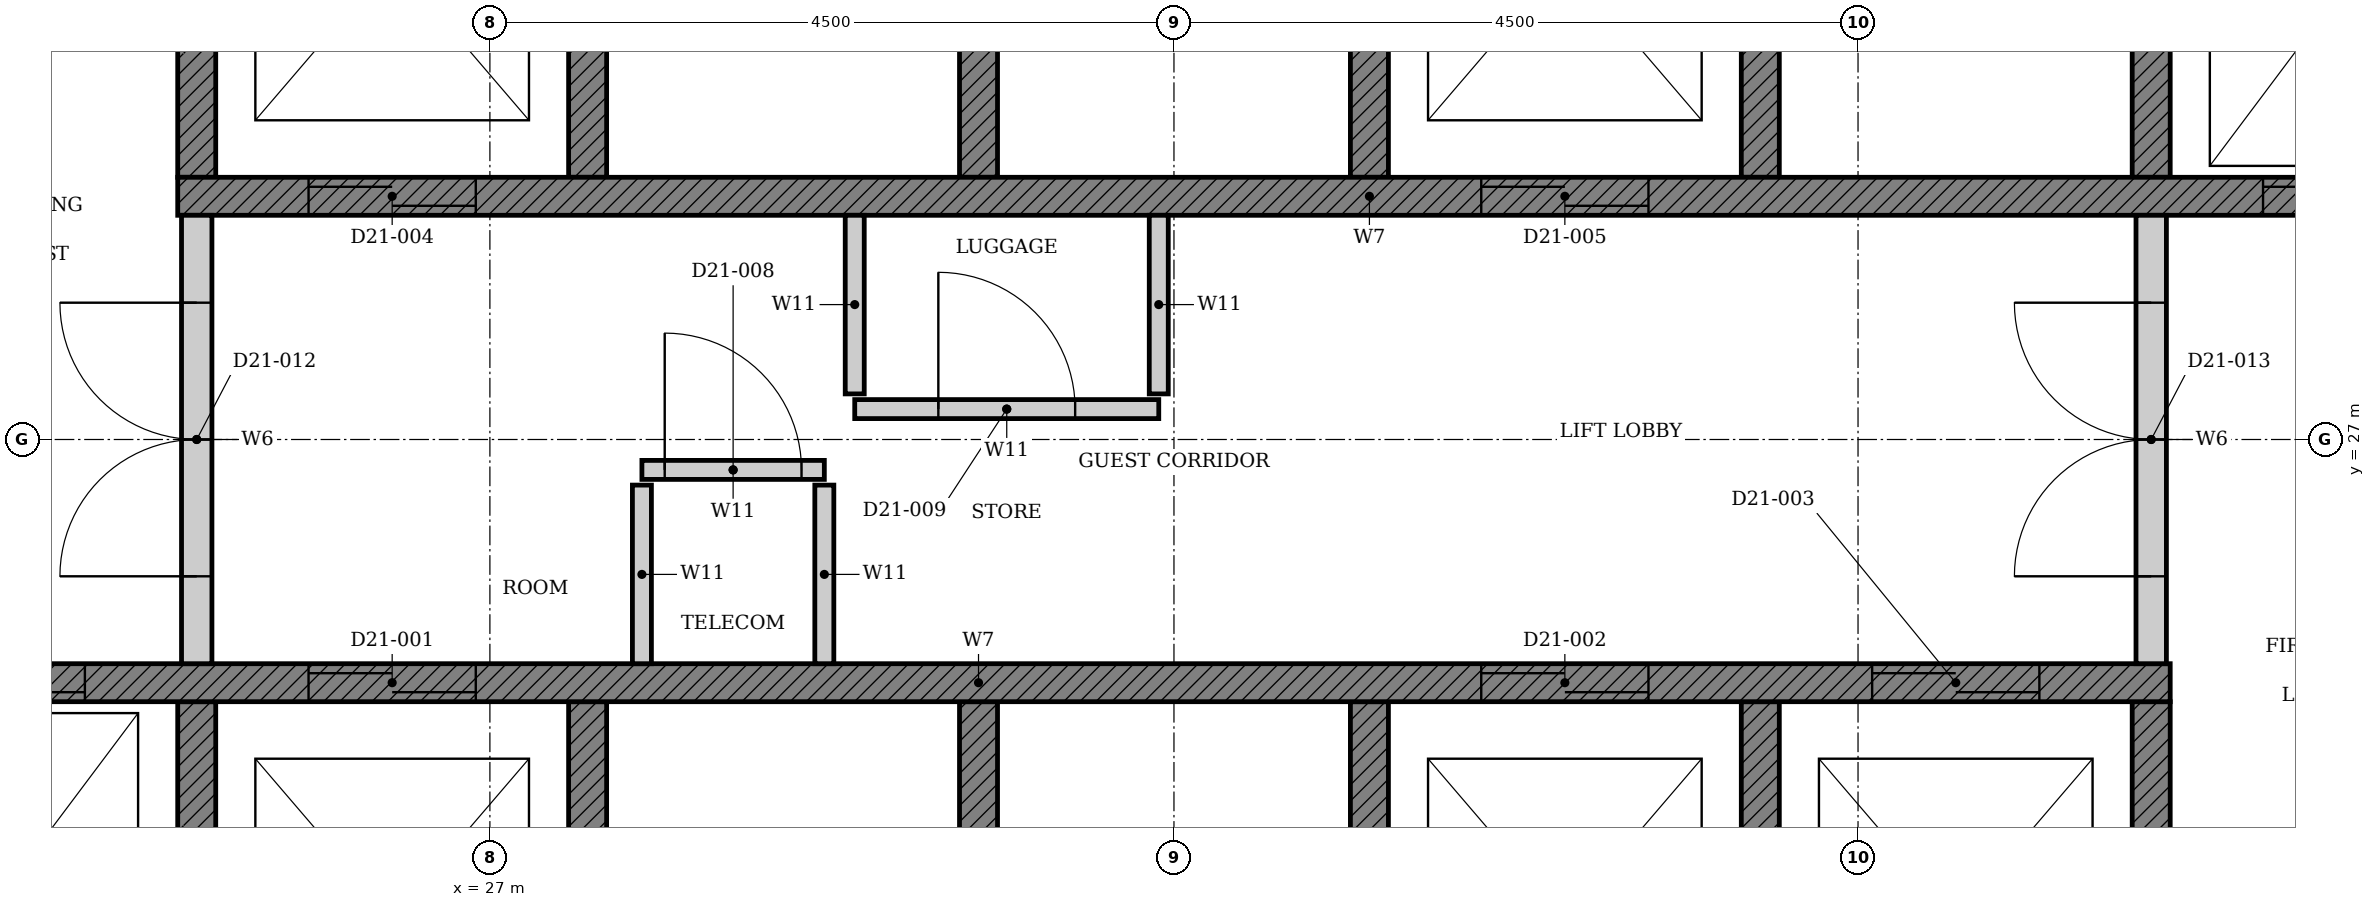
"""IFC4 building model, lengths in metres.
Left out: names, types, materials, properties, quantities, classifications, styles, units other than length and angle.
Written with IfcOpenShell. Run it as: python <this file> out.ifc"""

import sys

from ifc_helpers import new_model, si_unit, direction, frame, frame_2d, origin, place, context, subcontext, project, spatial, polyline, rectangle, outline, extrude, element, fill, save


model = new_model("IFC4")
c1 = context("Model", 3, precision=1e-05, world=origin(), true_north=direction((0.0, 1.0)))
c2 = subcontext(c1, "Body", "Model", "MODEL_VIEW")
j1 = project(units=[si_unit("LENGTHUNIT", "METRE"), si_unit("PLANEANGLEUNIT", "RADIAN")], contexts=[c1])
p1 = place(None, origin())
s1 = spatial("IfcSite", under=j1, at=p1, CompositionType="ELEMENT")
p2 = place(p1, origin())
s2 = spatial("IfcBuilding", under=s1, at=p2, CompositionType="ELEMENT")
p3 = place(p2, frame((0.0, 0.0, 88.8)))
s3 = spatial("IfcBuildingStorey", under=s2, at=p3, CompositionType="ELEMENT", Elevation=88.8)
p4 = place(p3, origin())
e1 = element("IfcWall", 1, at=p4, inside=s3, PredefinedType="SHEAR", context=c2, shape_type="SweptSolid", body=[
    extrude(outline(polyline([(22.375, 22.35), (38.053, 22.35), (38.053, 25.275), (37.803, 25.275), (37.803, 22.65), (35.482, 22.65), (35.482, 25.275), (35.232, 25.275), (35.232, 22.65), (32.911, 22.65), (32.911, 25.275), (32.661, 25.275), (32.661, 22.65), (30.339, 22.65), (30.339, 25.275), (30.089, 25.275), (30.089, 22.65), (27.768, 22.65), (27.768, 25.275), (27.518, 25.275), (27.518, 22.65), (25.197, 22.65), (25.197, 25.275), (24.947, 25.275), (24.947, 22.65), (22.625, 22.65), (22.625, 25.275), (22.375, 25.275), (22.375, 22.35)])), origin(), (0.0, 0.0, 1.0), 3.3),
])
p5 = place(p3, origin())
e2 = element("IfcWall", 2, at=p5, inside=s3, PredefinedType="SHEAR", context=c2, shape_type="SweptSolid", body=[
    extrude(outline(polyline([(24.947, 28.725), (25.197, 28.725), (25.197, 31.35), (27.518, 31.35), (27.518, 28.725), (27.768, 28.725), (27.768, 31.35), (30.089, 31.35), (30.089, 28.725), (30.339, 28.725), (30.339, 31.35), (32.661, 31.35), (32.661, 28.725), (32.911, 28.725), (32.911, 31.35), (35.232, 31.35), (35.232, 28.725), (35.482, 28.725), (35.482, 31.35), (37.803, 31.35), (37.803, 28.725), (38.053, 28.725), (38.053, 31.35), (40.375, 31.35), (40.375, 28.725), (40.625, 28.725), (40.625, 31.65), (24.947, 31.65), (24.947, 28.725)])), origin(), (0.0, 0.0, 1.0), 3.3),
])
p6 = place(p3, frame((22.375, 25.4, 0.0), z_axis=(0.0, 0.0, 1.0), x_axis=(1.0, 0.0, 0.0)))
e3 = element("IfcWall", 3, at=p6, inside=s3, PredefinedType="SHEAR", context=c2, shape_type="SweptSolid", body=[
    extrude(rectangle(XDim=15.678, YDim=0.25, at=frame_2d((7.839, 0.0))), origin(), (0.0, 0.0, 1.0), 3.3),
])
p7 = place(p6, frame((3.432, 0.0, 0.0)))
e4 = element("IfcOpeningElement", 4, at=p7, cuts=e3, PredefinedType="OPENING", context=c2, shape_type="SweptSolid", body=[
    extrude(rectangle(XDim=1.1, YDim=2.1, at=frame_2d((0.55, 1.05))), frame((0.0, 0.135, 0.0), z_axis=(0.0, -1.0, 0.0), x_axis=(1.0, 0.0, 0.0)), (0.0, 0.0, 1.0), 0.27),
])
p8 = place(p6, frame((11.146, 0.0, 0.0)))
e5 = element("IfcOpeningElement", 5, at=p8, cuts=e3, PredefinedType="OPENING", context=c2, shape_type="SweptSolid", body=[
    extrude(rectangle(XDim=1.1, YDim=2.1, at=frame_2d((0.55, 1.05))), frame((0.0, 0.135, 0.0), z_axis=(0.0, -1.0, 0.0), x_axis=(1.0, 0.0, 0.0)), (0.0, 0.0, 1.0), 0.27),
])
p9 = place(p6, frame((13.718, 0.0, 0.0)))
e6 = element("IfcOpeningElement", 6, at=p9, cuts=e3, PredefinedType="OPENING", context=c2, shape_type="SweptSolid", body=[
    extrude(rectangle(XDim=1.1, YDim=2.1, at=frame_2d((0.55, 1.05))), frame((0.0, 0.135, 0.0), z_axis=(0.0, -1.0, 0.0), x_axis=(1.0, 0.0, 0.0)), (0.0, 0.0, 1.0), 0.27),
])
p10 = place(p6, frame((0.861, 0.0, 0.0)))
e7 = element("IfcOpeningElement", 7, at=p10, cuts=e3, PredefinedType="OPENING", context=c2, shape_type="SweptSolid", body=[
    extrude(rectangle(XDim=1.1, YDim=2.1, at=frame_2d((0.55, 1.05))), frame((0.0, 0.135, 0.0), z_axis=(0.0, -1.0, 0.0), x_axis=(1.0, 0.0, 0.0)), (0.0, 0.0, 1.0), 0.27),
])
p11 = place(p3, frame((24.947, 28.6, 0.0), z_axis=(0.0, 0.0, 1.0), x_axis=(1.0, 0.0, 0.0)))
e8 = element("IfcWall", 8, at=p11, inside=s3, PredefinedType="SHEAR", context=c2, shape_type="SweptSolid", body=[
    extrude(rectangle(XDim=15.678, YDim=0.25, at=frame_2d((7.839, 0.0))), origin(), (0.0, 0.0, 1.0), 3.3),
])
p12 = place(p11, frame((0.861, 0.0, 0.0)))
e9 = element("IfcOpeningElement", 9, at=p12, cuts=e8, PredefinedType="OPENING", context=c2, shape_type="SweptSolid", body=[
    extrude(rectangle(XDim=1.1, YDim=2.1, at=frame_2d((0.55, 1.05))), frame((0.0, 0.135, 0.0), z_axis=(0.0, -1.0, 0.0), x_axis=(1.0, 0.0, 0.0)), (0.0, 0.0, 1.0), 0.27),
])
p13 = place(p11, frame((8.575, 0.0, 0.0)))
e10 = element("IfcOpeningElement", 10, at=p13, cuts=e8, PredefinedType="OPENING", context=c2, shape_type="SweptSolid", body=[
    extrude(rectangle(XDim=1.1, YDim=2.1, at=frame_2d((0.55, 1.05))), frame((0.0, 0.135, 0.0), z_axis=(0.0, -1.0, 0.0), x_axis=(1.0, 0.0, 0.0)), (0.0, 0.0, 1.0), 0.27),
])
p14 = place(p11, frame((13.718, 0.0, 0.0)))
e11 = element("IfcOpeningElement", 11, at=p14, cuts=e8, PredefinedType="OPENING", context=c2, shape_type="SweptSolid", body=[
    extrude(rectangle(XDim=1.1, YDim=2.1, at=frame_2d((0.55, 1.05))), frame((0.0, 0.135, 0.0), z_axis=(0.0, -1.0, 0.0), x_axis=(1.0, 0.0, 0.0)), (0.0, 0.0, 1.0), 0.27),
])
p15 = place(p3, frame((28.0, 26.8, 0.0), z_axis=(0.0, 0.0, 1.0), x_axis=(1.0, 0.0, 0.0)))
e12 = element("IfcWall", 12, at=p15, inside=s3, PredefinedType="PARTITIONING", context=c2, shape_type="SweptSolid", body=[
    extrude(rectangle(XDim=1.2, YDim=0.125, at=frame_2d((0.6, 0.0))), origin(), (0.0, 0.0, 1.0), 3.3),
])
p16 = place(p15, frame((0.15, 0.0, 0.0)))
e13 = element("IfcOpeningElement", 13, at=p16, cuts=e12, PredefinedType="OPENING", context=c2, shape_type="SweptSolid", body=[
    extrude(rectangle(XDim=0.9, YDim=2.1, at=frame_2d((0.45, 1.05))), frame((0.0, 0.073, 0.0), z_axis=(0.0, -1.0, 0.0), x_axis=(1.0, 0.0, 0.0)), (0.0, 0.0, 1.0), 0.145),
])
for number, where, z_axis, x_axis in (
    (14, (28.0, 25.525, 0.0), (0.0, 0.0, 1.0), (0.0, 1.0, 0.0)),
    (15, (29.2, 25.525, 0.0), (0.0, 0.0, 1.0), (0.0, 1.0, 0.0)),
):
    element("IfcWall", number, at=place(p3, frame(where, z_axis=z_axis, x_axis=x_axis)), inside=s3, PredefinedType="PARTITIONING", context=c2, shape_type="SweptSolid", body=[
        extrude(rectangle(XDim=1.175, YDim=0.125, at=frame_2d((0.587, 0.0))), origin(), (0.0, 0.0, 1.0), 3.3),
    ])
p17 = place(p3, frame((29.4, 27.2, 0.0), z_axis=(0.0, 0.0, 1.0), x_axis=(1.0, 0.0, 0.0)))
e16 = element("IfcWall", 16, at=p17, inside=s3, PredefinedType="PARTITIONING", context=c2, shape_type="SweptSolid", body=[
    extrude(rectangle(XDim=2.0, YDim=0.125, at=frame_2d((1.0, 0.0))), origin(), (0.0, 0.0, 1.0), 3.3),
])
p18 = place(p17, frame((0.55, 0.0, 0.0)))
e17 = element("IfcOpeningElement", 17, at=p18, cuts=e16, PredefinedType="OPENING", context=c2, shape_type="SweptSolid", body=[
    extrude(rectangle(XDim=0.9, YDim=2.1, at=frame_2d((0.45, 1.05))), frame((0.0, 0.073, 0.0), z_axis=(0.0, -1.0, 0.0), x_axis=(1.0, 0.0, 0.0)), (0.0, 0.0, 1.0), 0.145),
])
for number, where, z_axis, x_axis in (
    (18, (29.4, 28.475, 0.0), (0.0, 0.0, 1.0), (0.0, -1.0, 0.0)),
    (19, (31.4, 28.475, 0.0), (0.0, 0.0, 1.0), (0.0, -1.0, 0.0)),
):
    element("IfcWall", number, at=place(p3, frame(where, z_axis=z_axis, x_axis=x_axis)), inside=s3, PredefinedType="PARTITIONING", context=c2, shape_type="SweptSolid", body=[
        extrude(rectangle(XDim=1.175, YDim=0.125, at=frame_2d((0.587, 0.0))), origin(), (0.0, 0.0, 1.0), 3.3),
    ])
p19 = place(p3, frame((25.072, 25.525, 0.0), z_axis=(0.0, 0.0, 1.0), x_axis=(0.0, 1.0, 0.0)))
e20 = element("IfcWall", 20, at=p19, inside=s3, PredefinedType="PARTITIONING", context=c2, shape_type="SweptSolid", body=[
    extrude(rectangle(XDim=2.95, YDim=0.2, at=frame_2d((1.475, 0.0))), origin(), (0.0, 0.0, 1.0), 3.3),
])
p20 = place(p19, frame((0.575, 0.0, 0.0)))
e21 = element("IfcOpeningElement", 21, at=p20, cuts=e20, PredefinedType="OPENING", context=c2, shape_type="SweptSolid", body=[
    extrude(rectangle(XDim=1.8, YDim=2.1, at=frame_2d((0.9, 1.05))), frame((0.0, 0.11, 0.0), z_axis=(0.0, -1.0, 0.0), x_axis=(1.0, 0.0, 0.0)), (0.0, 0.0, 1.0), 0.22),
])
p21 = place(p3, frame((37.928, 25.525, 0.0), z_axis=(0.0, 0.0, 1.0), x_axis=(0.0, 1.0, 0.0)))
e22 = element("IfcWall", 22, at=p21, inside=s3, PredefinedType="PARTITIONING", context=c2, shape_type="SweptSolid", body=[
    extrude(rectangle(XDim=2.95, YDim=0.2, at=frame_2d((1.475, 0.0))), origin(), (0.0, 0.0, 1.0), 3.3),
])
p22 = place(p21, frame((0.575, 0.0, 0.0)))
e23 = element("IfcOpeningElement", 23, at=p22, cuts=e22, PredefinedType="OPENING", context=c2, shape_type="SweptSolid", body=[
    extrude(rectangle(XDim=1.8, YDim=2.1, at=frame_2d((0.9, 1.05))), frame((0.0, 0.11, 0.0), z_axis=(0.0, -1.0, 0.0), x_axis=(1.0, 0.0, 0.0)), (0.0, 0.0, 1.0), 0.22),
])
p23 = place(p7, origin())
e24 = element("IfcDoor", 24, at=p23, inside=s3, OperationType="DOUBLE_DOOR_SLIDING", PredefinedType="DOOR", context=c2, shape_type="SweptSolid", body=[
    extrude(rectangle(XDim=1.1, YDim=2.1, at=frame_2d((0.55, 1.05))), frame((0.0, 0.025, 0.0), z_axis=(0.0, -1.0, 0.0), x_axis=(1.0, 0.0, 0.0)), (0.0, 0.0, 1.0), 0.05),
])
fill(e4, e24)
p24 = place(p8, origin())
e25 = element("IfcDoor", 25, at=p24, inside=s3, OperationType="DOUBLE_DOOR_SLIDING", PredefinedType="DOOR", context=c2, shape_type="SweptSolid", body=[
    extrude(rectangle(XDim=1.1, YDim=2.1, at=frame_2d((0.55, 1.05))), frame((0.0, 0.025, 0.0), z_axis=(0.0, -1.0, 0.0), x_axis=(1.0, 0.0, 0.0)), (0.0, 0.0, 1.0), 0.05),
])
fill(e5, e25)
p25 = place(p9, origin())
e26 = element("IfcDoor", 26, at=p25, inside=s3, OperationType="DOUBLE_DOOR_SLIDING", PredefinedType="DOOR", context=c2, shape_type="SweptSolid", body=[
    extrude(rectangle(XDim=1.1, YDim=2.1, at=frame_2d((0.55, 1.05))), frame((0.0, 0.025, 0.0), z_axis=(0.0, -1.0, 0.0), x_axis=(1.0, 0.0, 0.0)), (0.0, 0.0, 1.0), 0.05),
])
fill(e6, e26)
p26 = place(p12, origin())
e27 = element("IfcDoor", 27, at=p26, inside=s3, OperationType="DOUBLE_DOOR_SLIDING", PredefinedType="DOOR", context=c2, shape_type="SweptSolid", body=[
    extrude(rectangle(XDim=1.1, YDim=2.1, at=frame_2d((0.55, 1.05))), frame((0.0, 0.025, 0.0), z_axis=(0.0, -1.0, 0.0), x_axis=(1.0, 0.0, 0.0)), (0.0, 0.0, 1.0), 0.05),
])
fill(e9, e27)
p27 = place(p13, origin())
e28 = element("IfcDoor", 28, at=p27, inside=s3, OperationType="DOUBLE_DOOR_SLIDING", PredefinedType="DOOR", context=c2, shape_type="SweptSolid", body=[
    extrude(rectangle(XDim=1.1, YDim=2.1, at=frame_2d((0.55, 1.05))), frame((0.0, 0.025, 0.0), z_axis=(0.0, -1.0, 0.0), x_axis=(1.0, 0.0, 0.0)), (0.0, 0.0, 1.0), 0.05),
])
fill(e10, e28)
p28 = place(p10, origin())
e29 = element("IfcDoor", 29, at=p28, inside=s3, OperationType="DOUBLE_DOOR_SLIDING", PredefinedType="DOOR", context=c2, shape_type="SweptSolid", body=[
    extrude(rectangle(XDim=1.1, YDim=2.1, at=frame_2d((0.55, 1.05))), frame((0.0, 0.025, 0.0), z_axis=(0.0, -1.0, 0.0), x_axis=(1.0, 0.0, 0.0)), (0.0, 0.0, 1.0), 0.05),
])
fill(e7, e29)
p29 = place(p14, origin())
e30 = element("IfcDoor", 30, at=p29, inside=s3, OperationType="DOUBLE_DOOR_SLIDING", PredefinedType="DOOR", context=c2, shape_type="SweptSolid", body=[
    extrude(rectangle(XDim=1.1, YDim=2.1, at=frame_2d((0.55, 1.05))), frame((0.0, 0.025, 0.0), z_axis=(0.0, -1.0, 0.0), x_axis=(1.0, 0.0, 0.0)), (0.0, 0.0, 1.0), 0.05),
])
fill(e11, e30)
p30 = place(p16, origin())
e31 = element("IfcDoor", 31, at=p30, inside=s3, OperationType="SINGLE_SWING_LEFT", PredefinedType="DOOR", context=c2, shape_type="SweptSolid", body=[
    extrude(rectangle(XDim=0.9, YDim=2.1, at=frame_2d((0.45, 1.05))), frame((0.0, 0.025, 0.0), z_axis=(0.0, -1.0, 0.0), x_axis=(1.0, 0.0, 0.0)), (0.0, 0.0, 1.0), 0.05),
])
fill(e13, e31)
p31 = place(p18, origin())
e32 = element("IfcDoor", 32, at=p31, inside=s3, OperationType="SINGLE_SWING_LEFT", PredefinedType="DOOR", context=c2, shape_type="SweptSolid", body=[
    extrude(rectangle(XDim=0.9, YDim=2.1, at=frame_2d((0.45, 1.05))), frame((0.0, 0.025, 0.0), z_axis=(0.0, -1.0, 0.0), x_axis=(1.0, 0.0, 0.0)), (0.0, 0.0, 1.0), 0.05),
])
fill(e17, e32)
p32 = place(p20, origin())
e33 = element("IfcDoor", 33, at=p32, inside=s3, OperationType="DOUBLE_DOOR_SINGLE_SWING", PredefinedType="DOOR", context=c2, shape_type="SweptSolid", body=[
    extrude(rectangle(XDim=1.8, YDim=2.1, at=frame_2d((0.9, 1.05))), frame((0.0, 0.025, 0.0), z_axis=(0.0, -1.0, 0.0), x_axis=(1.0, 0.0, 0.0)), (0.0, 0.0, 1.0), 0.05),
])
fill(e21, e33)
p33 = place(p22, origin())
e34 = element("IfcDoor", 34, at=p33, inside=s3, OperationType="DOUBLE_DOOR_SINGLE_SWING", PredefinedType="DOOR", context=c2, shape_type="SweptSolid", body=[
    extrude(rectangle(XDim=1.8, YDim=2.1, at=frame_2d((0.9, 1.05))), frame((0.0, 0.025, 0.0), z_axis=(0.0, -1.0, 0.0), x_axis=(1.0, 0.0, 0.0)), (0.0, 0.0, 1.0), 0.05),
])
fill(e23, e34)
save(model, sys.argv[1])
